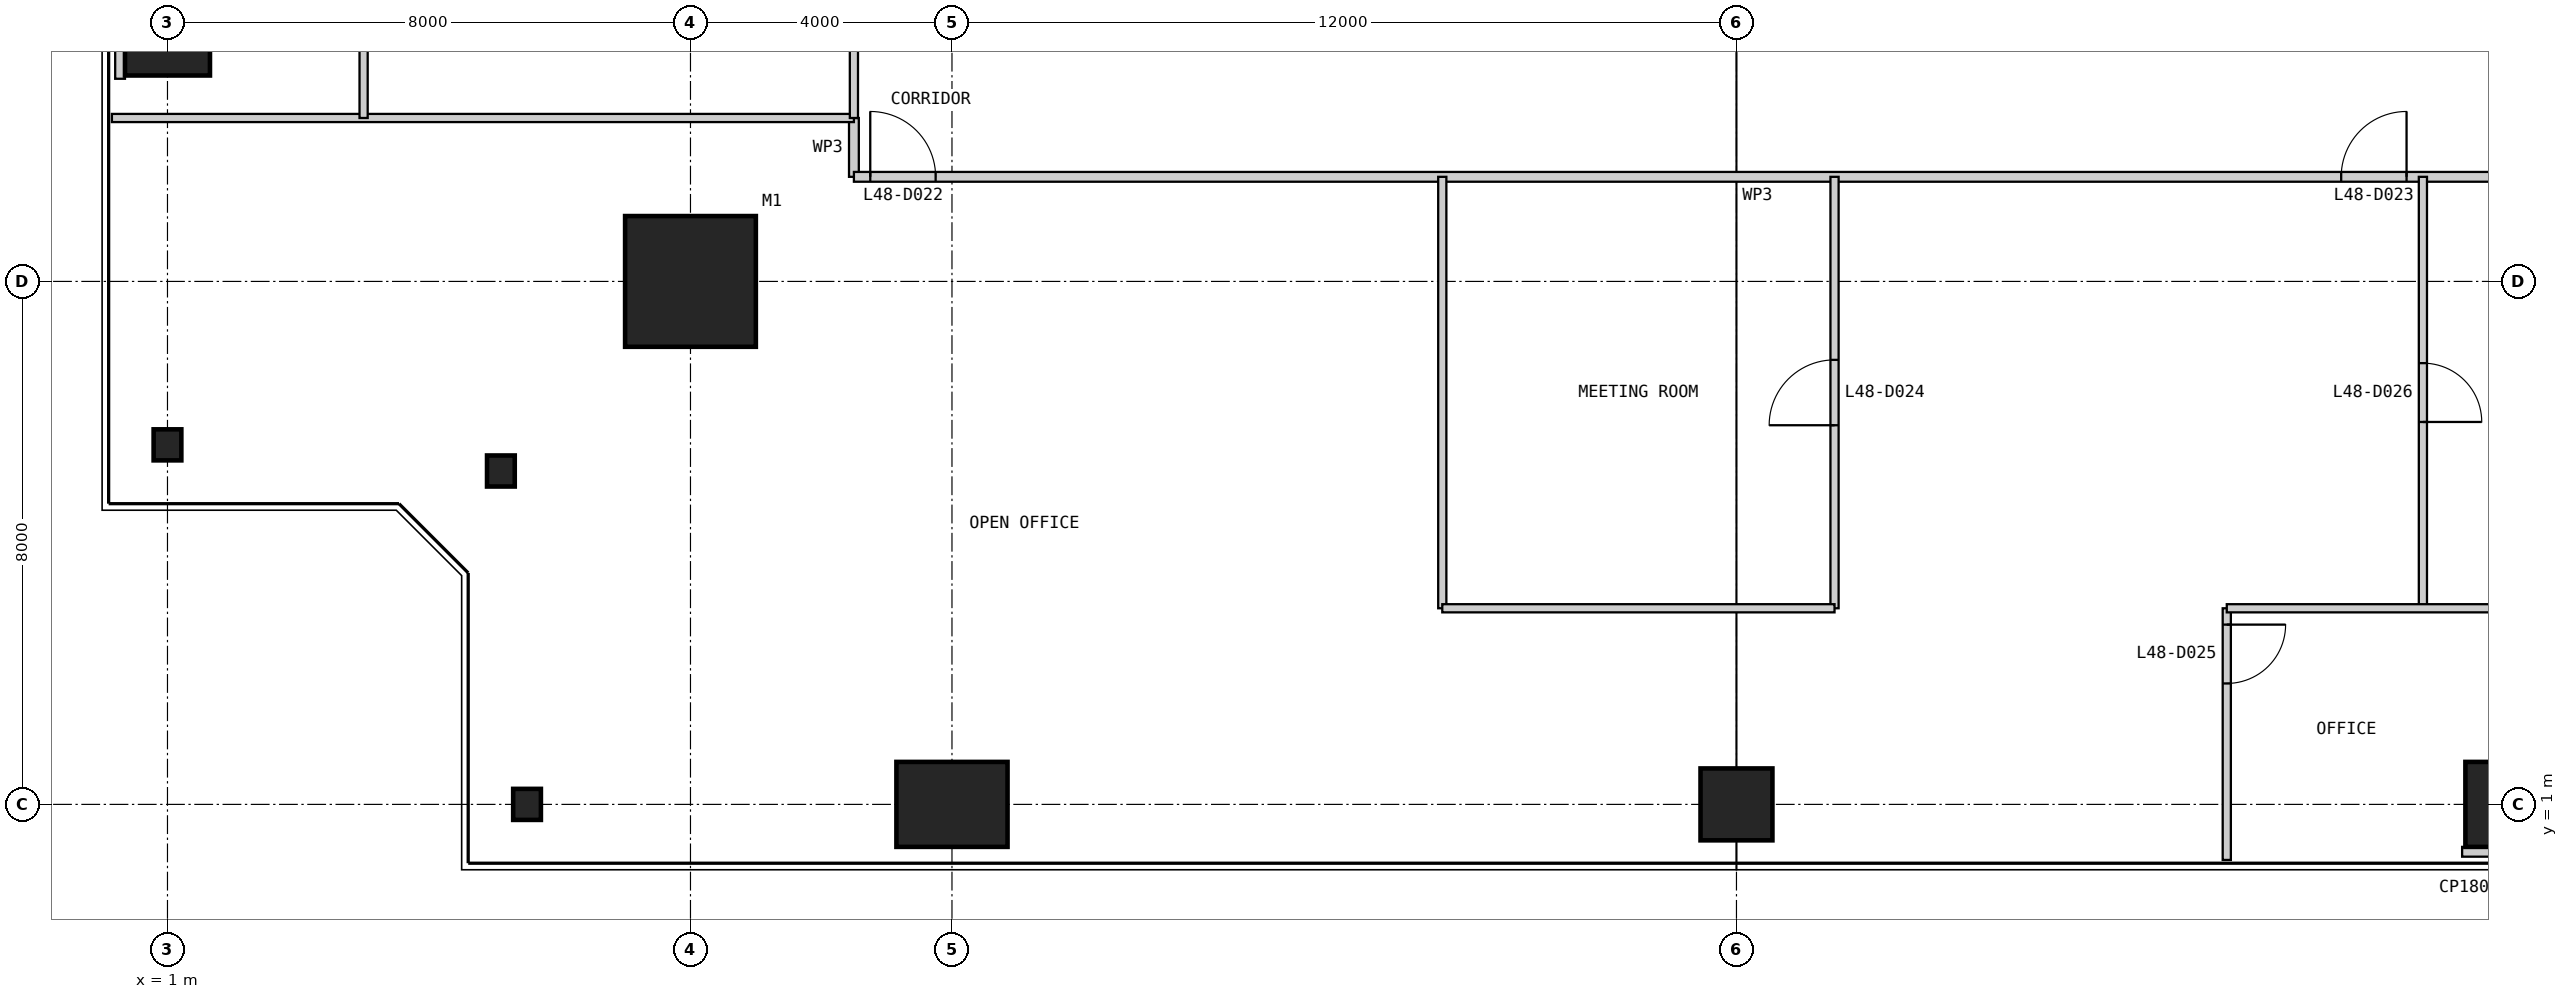
"""IFC4 building model, lengths in metres.
Left out: names, types, materials, properties, quantities, classifications, styles, units other than length and angle.
Written with IfcOpenShell. Run it as: python <this file> out.ifc"""

import sys

from ifc_helpers import new_model, si_unit, direction, frame, frame_2d, origin, origin_2d, place, context, subcontext, project, spatial, rectangle, i_section, extrude, element, fill, save


model = new_model("IFC4")
c1 = context("Model", 3, precision=1e-05, world=origin(), true_north=direction((0.0, 1.0)))
c2 = subcontext(c1, "Body", "Model", "MODEL_VIEW")
j1 = project(units=[si_unit("LENGTHUNIT", "METRE"), si_unit("PLANEANGLEUNIT", "RADIAN")], contexts=[c1])
p1 = place(None, origin())
s1 = spatial("IfcSite", under=j1, at=p1, CompositionType="ELEMENT")
p2 = place(p1, origin())
s2 = spatial("IfcBuilding", under=s1, at=p2, CompositionType="ELEMENT")
p3 = place(p2, frame((0.0, 0.0, 205.8)))
s3 = spatial("IfcBuildingStorey", under=s2, at=p3, CompositionType="ELEMENT", Elevation=205.8)
p4 = place(p3, frame((9.0, 9.0, 0.0), z_axis=(0.0, 0.0, 1.0), x_axis=(1.0, 0.0, 0.0)))
e1 = element("IfcColumn", 1, at=p4, inside=s3, PredefinedType="COLUMN", context=c2, shape_type="SweptSolid", body=[
    extrude(rectangle(XDim=2.0, YDim=2.0, at=origin_2d()), origin(), (0.0, 0.0, 1.0), 4.0),
])
p5 = place(p3, frame((6.5, 1.0, 0.0), z_axis=(0.0, 0.0, 1.0), x_axis=(1.0, 0.0, 0.0)))
e2 = element("IfcColumn", 2, at=p5, inside=s3, PredefinedType="COLUMN", context=c2, shape_type="SweptSolid", body=[
    extrude(i_section(OverallWidth=0.424, OverallDepth=0.475, WebThickness=0.048, FlangeThickness=0.077, at=origin_2d()), origin(), (0.0, 0.0, 1.0), 4.0),
])
p6 = place(p3, frame((13.0, 1.0, 0.0), z_axis=(0.0, 0.0, 1.0), x_axis=(1.0, 0.0, 0.0)))
e3 = element("IfcColumn", 3, at=p6, inside=s3, PredefinedType="COLUMN", context=c2, shape_type="SweptSolid", body=[
    extrude(rectangle(XDim=1.7, YDim=1.3, at=origin_2d()), origin(), (0.0, 0.0, 1.0), 4.0),
])
p7 = place(p3, frame((25.0, 1.0, 0.0), z_axis=(0.0, 0.0, 1.0), x_axis=(1.0, 0.0, 0.0)))
e4 = element("IfcColumn", 4, at=p7, inside=s3, PredefinedType="COLUMN", context=c2, shape_type="SweptSolid", body=[
    extrude(rectangle(XDim=1.1, YDim=1.1, at=origin_2d()), origin(), (0.0, 0.0, 1.0), 4.0),
])
p8 = place(p3, frame((37.0, 1.0, 0.0), z_axis=(0.0, 0.0, 1.0), x_axis=(1.0, 0.0, 0.0)))
e5 = element("IfcColumn", 5, at=p8, inside=s3, PredefinedType="COLUMN", context=c2, shape_type="SweptSolid", body=[
    extrude(rectangle(XDim=1.7, YDim=1.3, at=origin_2d()), origin(), (0.0, 0.0, 1.0), 4.0),
])
p9 = place(p3, frame((1.0, 13.0, 0.0), z_axis=(0.0, 0.0, 1.0), x_axis=(1.0, 0.0, 0.0)))
e6 = element("IfcColumn", 6, at=p9, inside=s3, PredefinedType="COLUMN", context=c2, shape_type="SweptSolid", body=[
    extrude(rectangle(XDim=1.3, YDim=1.7, at=origin_2d()), origin(), (0.0, 0.0, 1.0), 4.0),
])
for number, where, z_axis, x_axis in (
    (7, (1.0, 6.5, 0.0), (0.0, 0.0, 1.0), (1.0, 0.0, 0.0)),
    (8, (6.1, 6.1, 0.0), (0.0, 0.0, 1.0), (1.0, 0.0, 0.0)),
):
    element("IfcColumn", number, at=place(p3, frame(where, z_axis=z_axis, x_axis=x_axis)), inside=s3, PredefinedType="COLUMN", context=c2, shape_type="SweptSolid", body=[
        extrude(i_section(OverallWidth=0.424, OverallDepth=0.475, WebThickness=0.048, FlangeThickness=0.077, at=origin_2d()), origin(), (0.0, 0.0, 1.0), 4.0),
    ])
p10 = place(p3, frame((11.5, 11.5, 0.0), z_axis=(0.0, 0.0, 1.0), x_axis=(0.0, -1.0, 0.0)))
e9 = element("IfcWall", 9, at=p10, inside=s3, PredefinedType="PARTITIONING", context=c2, shape_type="SweptSolid", body=[
    extrude(rectangle(XDim=0.9, YDim=0.15, at=frame_2d((0.45, 0.0))), origin(), (0.0, 0.0, 1.0), 3.85),
])
p11 = place(p3, frame((11.5, 10.6, 0.0), z_axis=(0.0, 0.0, 1.0), x_axis=(1.0, 0.0, 0.0)))
e10 = element("IfcWall", 10, at=p11, inside=s3, PredefinedType="PARTITIONING", context=c2, shape_type="SweptSolid", body=[
    extrude(rectangle(XDim=27.0, YDim=0.15, at=frame_2d((13.5, 0.0))), origin(), (0.0, 0.0, 1.0), 3.85),
])
p12 = place(p11, frame((0.25, 0.0, 0.0)))
e11 = element("IfcOpeningElement", 11, at=p12, cuts=e10, PredefinedType="OPENING", context=c2, shape_type="SweptSolid", body=[
    extrude(rectangle(XDim=1.0, YDim=2.2, at=frame_2d((0.5, 1.1))), frame((0.0, 0.085, 0.0), z_axis=(0.0, -1.0, 0.0), x_axis=(1.0, 0.0, 0.0)), (0.0, 0.0, 1.0), 0.17),
])
p13 = place(p11, frame((22.75, 0.0, 0.0)))
e12 = element("IfcOpeningElement", 12, at=p13, cuts=e10, PredefinedType="OPENING", context=c2, shape_type="SweptSolid", body=[
    extrude(rectangle(XDim=1.0, YDim=2.2, at=frame_2d((0.5, 1.1))), frame((0.0, 0.085, 0.0), z_axis=(0.0, -1.0, 0.0), x_axis=(1.0, 0.0, 0.0)), (0.0, 0.0, 1.0), 0.17),
])
p14 = place(p3, frame((0.15, 11.5, 0.0), z_axis=(0.0, 0.0, 1.0), x_axis=(1.0, 0.0, 0.0)))
e13 = element("IfcWall", 13, at=p14, inside=s3, PredefinedType="PARTITIONING", context=c2, shape_type="SweptSolid", body=[
    extrude(rectangle(XDim=11.35, YDim=0.125, at=frame_2d((5.675, 0.0))), origin(), (0.0, 0.0, 1.0), 3.85),
])
p15 = place(p3, frame((20.5, 4.0, 0.0), z_axis=(0.0, 0.0, 1.0), x_axis=(0.0, 1.0, 0.0)))
e14 = element("IfcWall", 14, at=p15, inside=s3, PredefinedType="PARTITIONING", context=c2, shape_type="SweptSolid", body=[
    extrude(rectangle(XDim=6.6, YDim=0.125, at=frame_2d((3.3, 0.0))), origin(), (0.0, 0.0, 1.0), 3.85),
])
p16 = place(p3, frame((26.5, 4.0, 0.0), z_axis=(0.0, 0.0, 1.0), x_axis=(0.0, 1.0, 0.0)))
e15 = element("IfcWall", 15, at=p16, inside=s3, PredefinedType="PARTITIONING", context=c2, shape_type="SweptSolid", body=[
    extrude(rectangle(XDim=6.6, YDim=0.125, at=frame_2d((3.3, 0.0))), origin(), (0.0, 0.0, 1.0), 3.85),
])
p17 = place(p16, frame((2.8, 0.0, 0.0)))
e16 = element("IfcOpeningElement", 16, at=p17, cuts=e15, PredefinedType="OPENING", context=c2, shape_type="SweptSolid", body=[
    extrude(rectangle(XDim=1.0, YDim=2.2, at=frame_2d((0.5, 1.1))), frame((0.0, 0.073, 0.0), z_axis=(0.0, -1.0, 0.0), x_axis=(1.0, 0.0, 0.0)), (0.0, 0.0, 1.0), 0.145),
])
p18 = place(p3, frame((32.5, 0.15, 0.0), z_axis=(0.0, 0.0, 1.0), x_axis=(0.0, 1.0, 0.0)))
e17 = element("IfcWall", 17, at=p18, inside=s3, PredefinedType="PARTITIONING", context=c2, shape_type="SweptSolid", body=[
    extrude(rectangle(XDim=3.85, YDim=0.125, at=frame_2d((1.925, 0.0))), origin(), (0.0, 0.0, 1.0), 3.85),
])
p19 = place(p18, frame((2.7, 0.0, 0.0)))
e18 = element("IfcOpeningElement", 18, at=p19, cuts=e17, PredefinedType="OPENING", context=c2, shape_type="SweptSolid", body=[
    extrude(rectangle(XDim=0.9, YDim=2.2, at=frame_2d((0.45, 1.1))), frame((0.0, 0.073, 0.0), z_axis=(0.0, -1.0, 0.0), x_axis=(1.0, 0.0, 0.0)), (0.0, 0.0, 1.0), 0.145),
])
p20 = place(p3, frame((35.5, 4.0, 0.0), z_axis=(0.0, 0.0, 1.0), x_axis=(0.0, 1.0, 0.0)))
e19 = element("IfcWall", 19, at=p20, inside=s3, PredefinedType="PARTITIONING", context=c2, shape_type="SweptSolid", body=[
    extrude(rectangle(XDim=6.6, YDim=0.125, at=frame_2d((3.3, 0.0))), origin(), (0.0, 0.0, 1.0), 3.85),
])
p21 = place(p20, frame((2.85, 0.0, 0.0)))
e20 = element("IfcOpeningElement", 20, at=p21, cuts=e19, PredefinedType="OPENING", context=c2, shape_type="SweptSolid", body=[
    extrude(rectangle(XDim=0.9, YDim=2.2, at=frame_2d((0.45, 1.1))), frame((0.0, 0.073, 0.0), z_axis=(0.0, -1.0, 0.0), x_axis=(1.0, 0.0, 0.0)), (0.0, 0.0, 1.0), 0.145),
])
for number, where, z_axis, x_axis in (
    (21, (20.5, 4.0, 0.0), (0.0, 0.0, 1.0), (1.0, 0.0, 0.0)),
    (22, (32.5, 4.0, 0.0), (0.0, 0.0, 1.0), (1.0, 0.0, 0.0)),
):
    element("IfcWall", number, at=place(p3, frame(where, z_axis=z_axis, x_axis=x_axis)), inside=s3, PredefinedType="PARTITIONING", context=c2, shape_type="SweptSolid", body=[
        extrude(rectangle(XDim=6.0, YDim=0.125, at=frame_2d((3.0, 0.0))), origin(), (0.0, 0.0, 1.0), 3.85),
    ])
p22 = place(p3, frame((4.0, 17.5, 0.0), z_axis=(0.0, 0.0, 1.0), x_axis=(0.0, -1.0, 0.0)))
e23 = element("IfcWall", 23, at=p22, inside=s3, PredefinedType="PARTITIONING", context=c2, shape_type="SweptSolid", body=[
    extrude(rectangle(XDim=6.0, YDim=0.125, at=frame_2d((3.0, 0.0))), origin(), (0.0, 0.0, 1.0), 3.238),
])
p23 = place(p3, frame((11.5, 14.5, 0.0), z_axis=(0.0, 0.0, 1.0), x_axis=(0.0, -1.0, 0.0)))
e24 = element("IfcWall", 24, at=p23, inside=s3, PredefinedType="PARTITIONING", context=c2, shape_type="SweptSolid", body=[
    extrude(rectangle(XDim=3.0, YDim=0.125, at=frame_2d((1.5, 0.0))), origin(), (0.0, 0.0, 1.0), 3.85),
])
for number, where, z_axis, x_axis in (
    (25, (37.0, 0.2, 0.0), (0.0, 0.0, 1.0), (0.0, 1.0, 0.0)),
    (26, (0.2, 13.0, 0.0), (0.0, 0.0, 1.0), (1.0, 0.0, 0.0)),
):
    element("IfcWall", number, at=place(p3, frame(where, z_axis=z_axis, x_axis=x_axis)), inside=s3, PredefinedType="PARTITIONING", context=c2, shape_type="SweptSolid", body=[
        extrude(rectangle(XDim=0.15, YDim=1.8, at=frame_2d((0.075, 0.0))), origin(), (0.0, 0.0, 1.0), 3.85),
    ])
p24 = place(p12, origin())
e27 = element("IfcDoor", 27, at=p24, inside=s3, OperationType="SINGLE_SWING_LEFT", PredefinedType="DOOR", context=c2, shape_type="SweptSolid", body=[
    extrude(rectangle(XDim=1.0, YDim=2.2, at=frame_2d((0.5, 1.1))), frame((0.0, 0.025, 0.0), z_axis=(0.0, -1.0, 0.0), x_axis=(1.0, 0.0, 0.0)), (0.0, 0.0, 1.0), 0.05),
])
fill(e11, e27)
p25 = place(p13, origin())
e28 = element("IfcDoor", 28, at=p25, inside=s3, OperationType="SINGLE_SWING_RIGHT", PredefinedType="DOOR", context=c2, shape_type="SweptSolid", body=[
    extrude(rectangle(XDim=1.0, YDim=2.2, at=frame_2d((0.5, 1.1))), frame((0.0, 0.025, 0.0), z_axis=(0.0, -1.0, 0.0), x_axis=(1.0, 0.0, 0.0)), (0.0, 0.0, 1.0), 0.05),
])
fill(e12, e28)
p26 = place(p17, origin())
e29 = element("IfcDoor", 29, at=p26, inside=s3, OperationType="SINGLE_SWING_LEFT", PredefinedType="DOOR", context=c2, shape_type="SweptSolid", body=[
    extrude(rectangle(XDim=1.0, YDim=2.2, at=frame_2d((0.5, 1.1))), frame((0.0, 0.025, 0.0), z_axis=(0.0, -1.0, 0.0), x_axis=(1.0, 0.0, 0.0)), (0.0, 0.0, 1.0), 0.05),
])
fill(e16, e29)
p27 = place(p19, frame((0.9, 0.0, 0.0), z_axis=(0.0, 0.0, 1.0), x_axis=(-1.0, 0.0, 0.0)))
e30 = element("IfcDoor", 30, at=p27, inside=s3, OperationType="SINGLE_SWING_LEFT", PredefinedType="DOOR", context=c2, shape_type="SweptSolid", body=[
    extrude(rectangle(XDim=0.9, YDim=2.2, at=frame_2d((0.45, 1.1))), frame((0.0, 0.025, 0.0), z_axis=(0.0, -1.0, 0.0), x_axis=(1.0, 0.0, 0.0)), (0.0, 0.0, 1.0), 0.05),
])
fill(e18, e30)
p28 = place(p21, frame((0.9, 0.0, 0.0), z_axis=(0.0, 0.0, 1.0), x_axis=(-1.0, 0.0, 0.0)))
e31 = element("IfcDoor", 31, at=p28, inside=s3, OperationType="SINGLE_SWING_RIGHT", PredefinedType="DOOR", context=c2, shape_type="SweptSolid", body=[
    extrude(rectangle(XDim=0.9, YDim=2.2, at=frame_2d((0.45, 1.1))), frame((0.0, 0.025, 0.0), z_axis=(0.0, -1.0, 0.0), x_axis=(1.0, 0.0, 0.0)), (0.0, 0.0, 1.0), 0.05),
])
fill(e20, e31)
save(model, sys.argv[1])
